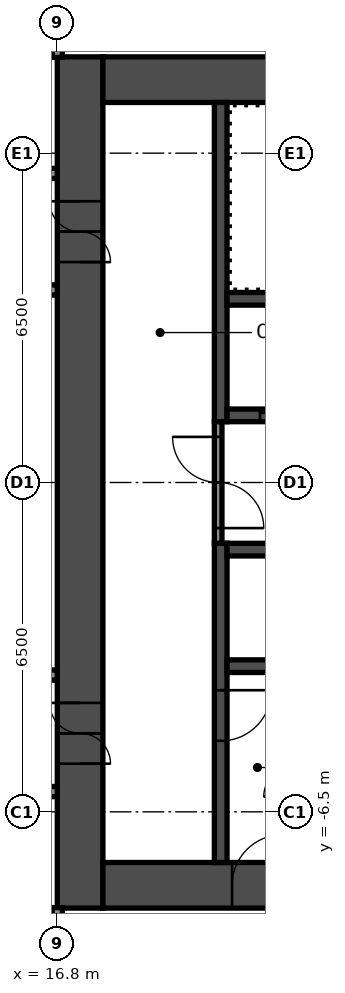
"""IFC4 building model, lengths in metres.
Left out: names, types, materials, properties, quantities, classifications, styles, units other than length and angle.
Written with IfcOpenShell. Run it as: python <this file> out.ifc"""

import sys

from ifc_helpers import new_model, si_unit, direction, frame, frame_2d, origin, place, context, subcontext, project, spatial, rectangle, extrude, element, fill, save


model = new_model("IFC4")
c1 = context("Model", 3, precision=1e-05, world=origin(), true_north=direction((0.0, 1.0)))
c2 = subcontext(c1, "Body", "Model", "MODEL_VIEW")
j1 = project(units=[si_unit("LENGTHUNIT", "METRE"), si_unit("PLANEANGLEUNIT", "RADIAN")], contexts=[c1])
p1 = place(None, origin())
s1 = spatial("IfcSite", under=j1, at=p1, CompositionType="ELEMENT")
p2 = place(p1, origin())
s2 = spatial("IfcBuilding", under=s1, at=p2, CompositionType="ELEMENT")
p3 = place(p2, frame((0.0, 0.0, 48.6)))
s3 = spatial("IfcBuildingStorey", under=s2, at=p3, CompositionType="ELEMENT", Elevation=48.6)
p4 = place(p3, frame((17.25, -8.4, 0.0), z_axis=(0.0, 0.0, 1.0), x_axis=(0.0, 1.0, 0.0)))
e1 = element("IfcWall", 1, at=p4, inside=s3, PredefinedType="SHEAR", context=c2, shape_type="SweptSolid", body=[
    extrude(rectangle(XDim=16.8, YDim=0.9, at=frame_2d((8.4, 0.0))), origin(), (0.0, 0.0, 1.0), 2.8),
])
p5 = place(p4, frame((12.75, 0.0, 0.0)))
e2 = element("IfcOpeningElement", 2, at=p5, cuts=e1, PredefinedType="OPENING", context=c2, shape_type="SweptSolid", body=[
    extrude(rectangle(XDim=1.2, YDim=2.1, at=frame_2d((0.6, 1.05))), frame((0.0, 0.46, 0.0), z_axis=(0.0, -1.0, 0.0), x_axis=(1.0, 0.0, 0.0)), (0.0, 0.0, 1.0), 0.92),
])
p6 = place(p4, frame((2.85, 0.0, 0.0)))
e3 = element("IfcOpeningElement", 3, at=p6, cuts=e1, PredefinedType="OPENING", context=c2, shape_type="SweptSolid", body=[
    extrude(rectangle(XDim=1.2, YDim=2.1, at=frame_2d((0.6, 1.05))), frame((0.0, 0.46, 0.0), z_axis=(0.0, -1.0, 0.0), x_axis=(1.0, 0.0, 0.0)), (0.0, 0.0, 1.0), 0.92),
])
p7 = place(p3, frame((17.7, 7.95, 0.0), z_axis=(0.0, 0.0, 1.0), x_axis=(1.0, 0.0, 0.0)))
e4 = element("IfcWall", 4, at=p7, inside=s3, PredefinedType="SHEAR", context=c2, shape_type="SweptSolid", body=[
    extrude(rectangle(XDim=15.0, YDim=0.9, at=frame_2d((7.5, 0.0))), origin(), (0.0, 0.0, 1.0), 2.8),
])
p8 = place(p7, frame((10.4, 0.0, 0.0)))
e5 = element("IfcOpeningElement", 5, at=p8, cuts=e4, PredefinedType="OPENING", context=c2, shape_type="SweptSolid", body=[
    extrude(rectangle(XDim=1.2, YDim=2.1, at=frame_2d((0.6, 1.05))), frame((0.0, 0.46, 0.0), z_axis=(0.0, -1.0, 0.0), x_axis=(1.0, 0.0, 0.0)), (0.0, 0.0, 1.0), 0.92),
])
p9 = place(p7, frame((13.35, 0.0, 0.0)))
e6 = element("IfcOpeningElement", 6, at=p9, cuts=e4, PredefinedType="OPENING", context=c2, shape_type="SweptSolid", body=[
    extrude(rectangle(XDim=0.9, YDim=2.1, at=frame_2d((0.45, 1.05))), frame((0.0, 0.46, 0.0), z_axis=(0.0, -1.0, 0.0), x_axis=(1.0, 0.0, 0.0)), (0.0, 0.0, 1.0), 0.92),
])
p10 = place(p3, frame((17.7, -7.95, 0.0), z_axis=(0.0, 0.0, 1.0), x_axis=(1.0, 0.0, 0.0)))
e7 = element("IfcWall", 7, at=p10, inside=s3, PredefinedType="SHEAR", context=c2, shape_type="SweptSolid", body=[
    extrude(rectangle(XDim=15.0, YDim=0.9, at=frame_2d((7.5, 0.0))), origin(), (0.0, 0.0, 1.0), 2.8),
])
p11 = place(p10, frame((2.55, 0.0, 0.0)))
e8 = element("IfcOpeningElement", 8, at=p11, cuts=e7, PredefinedType="OPENING", context=c2, shape_type="SweptSolid", body=[
    extrude(rectangle(XDim=1.0, YDim=2.1, at=frame_2d((0.5, 1.05))), frame((0.0, 0.46, 0.0), z_axis=(0.0, -1.0, 0.0), x_axis=(1.0, 0.0, 0.0)), (0.0, 0.0, 1.0), 0.92),
])
p12 = place(p3, frame((20.025, 1.2, 0.0), z_axis=(0.0, 0.0, 1.0), x_axis=(0.0, 1.0, 0.0)))
e9 = element("IfcWall", 9, at=p12, inside=s3, PredefinedType="SHEAR", context=c2, shape_type="SweptSolid", body=[
    extrude(rectangle(XDim=6.3, YDim=0.25, at=frame_2d((3.15, 0.0))), origin(), (0.0, 0.0, 1.0), 2.8),
])
p13 = place(p3, frame((20.025, -7.5, 0.0), z_axis=(0.0, 0.0, 1.0), x_axis=(0.0, 1.0, 0.0)))
e10 = element("IfcWall", 10, at=p13, inside=s3, PredefinedType="SHEAR", context=c2, shape_type="SweptSolid", body=[
    extrude(rectangle(XDim=6.3, YDim=0.25, at=frame_2d((3.15, 0.0))), origin(), (0.0, 0.0, 1.0), 2.8),
])
p14 = place(p13, frame((2.4, 0.0, 0.0)))
e11 = element("IfcOpeningElement", 11, at=p14, cuts=e10, PredefinedType="OPENING", context=c2, shape_type="SweptSolid", body=[
    extrude(rectangle(XDim=1.0, YDim=2.1, at=frame_2d((0.5, 1.05))), frame((0.0, 0.135, 0.0), z_axis=(0.0, -1.0, 0.0), x_axis=(1.0, 0.0, 0.0)), (0.0, 0.0, 1.0), 0.27),
])
p15 = place(p3, frame((20.15, 1.325, 0.0), z_axis=(0.0, 0.0, 1.0), x_axis=(1.0, 0.0, 0.0)))
e12 = element("IfcWall", 12, at=p15, inside=s3, PredefinedType="SHEAR", context=c2, shape_type="SweptSolid", body=[
    extrude(rectangle(XDim=7.5, YDim=0.25, at=frame_2d((3.75, 0.0))), origin(), (0.0, 0.0, 1.0), 2.8),
])
p16 = place(p15, frame((0.65, 0.0, 0.0)))
e13 = element("IfcOpeningElement", 13, at=p16, cuts=e12, PredefinedType="OPENING", context=c2, shape_type="SweptSolid", body=[
    extrude(rectangle(XDim=1.1, YDim=2.1, at=frame_2d((0.55, 1.05))), frame((0.0, 0.135, 0.0), z_axis=(0.0, -1.0, 0.0), x_axis=(1.0, 0.0, 0.0)), (0.0, 0.0, 1.0), 0.27),
])
p17 = place(p15, frame((3.05, 0.0, 0.0)))
e14 = element("IfcOpeningElement", 14, at=p17, cuts=e12, PredefinedType="OPENING", context=c2, shape_type="SweptSolid", body=[
    extrude(rectangle(XDim=1.1, YDim=2.1, at=frame_2d((0.55, 1.05))), frame((0.0, 0.135, 0.0), z_axis=(0.0, -1.0, 0.0), x_axis=(1.0, 0.0, 0.0)), (0.0, 0.0, 1.0), 0.27),
])
p18 = place(p15, frame((5.45, 0.0, 0.0)))
e15 = element("IfcOpeningElement", 15, at=p18, cuts=e12, PredefinedType="OPENING", context=c2, shape_type="SweptSolid", body=[
    extrude(rectangle(XDim=1.1, YDim=2.1, at=frame_2d((0.55, 1.05))), frame((0.0, 0.135, 0.0), z_axis=(0.0, -1.0, 0.0), x_axis=(1.0, 0.0, 0.0)), (0.0, 0.0, 1.0), 0.27),
])
for number, where, z_axis, x_axis in (
    (16, (20.15, 3.625, 0.0), (0.0, 0.0, 1.0), (1.0, 0.0, 0.0)),
    (17, (20.15, -1.325, 0.0), (0.0, 0.0, 1.0), (1.0, 0.0, 0.0)),
    (18, (20.15, -3.625, 0.0), (0.0, 0.0, 1.0), (1.0, 0.0, 0.0)),
):
    element("IfcWall", number, at=place(p3, frame(where, z_axis=z_axis, x_axis=x_axis)), inside=s3, PredefinedType="SHEAR", context=c2, shape_type="SweptSolid", body=[
        extrude(rectangle(XDim=7.5, YDim=0.25, at=frame_2d((3.75, 0.0))), origin(), (0.0, 0.0, 1.0), 2.8),
    ])
p19 = place(p3, frame((19.975, -1.2, 0.0), z_axis=(0.0, 0.0, 1.0), x_axis=(0.0, 1.0, 0.0)))
e19 = element("IfcWall", 19, at=p19, inside=s3, PredefinedType="PARTITIONING", context=c2, shape_type="SweptSolid", body=[
    extrude(rectangle(XDim=2.4, YDim=0.15, at=frame_2d((1.2, 0.0))), origin(), (0.0, 0.0, 1.0), 2.8),
])
p20 = place(p19, frame((0.3, 0.0, 0.0)))
e20 = element("IfcOpeningElement", 20, at=p20, cuts=e19, PredefinedType="OPENING", context=c2, shape_type="SweptSolid", body=[
    extrude(rectangle(XDim=1.8, YDim=2.1, at=frame_2d((0.9, 1.05))), frame((0.0, 0.085, 0.0), z_axis=(0.0, -1.0, 0.0), x_axis=(1.0, 0.0, 0.0)), (0.0, 0.0, 1.0), 0.17),
])
p21 = place(p3, frame((-16.8, -6.1, 0.0), z_axis=(0.0, 0.0, 1.0), x_axis=(1.0, 0.0, 0.0)))
e21 = element("IfcWall", 21, at=p21, inside=s3, PredefinedType="PARTITIONING", context=c2, shape_type="SweptSolid", body=[
    extrude(rectangle(XDim=33.6, YDim=0.2, at=frame_2d((16.8, 0.0))), origin(), (0.0, 0.0, 1.0), 2.8),
])
p22 = place(p21, frame((5.8, 0.0, 0.0)))
e22 = element("IfcOpeningElement", 22, at=p22, cuts=e21, PredefinedType="OPENING", context=c2, shape_type="SweptSolid", body=[
    extrude(rectangle(XDim=1.0, YDim=2.1, at=frame_2d((0.5, 1.05))), frame((0.0, 0.11, 0.0), z_axis=(0.0, -1.0, 0.0), x_axis=(1.0, 0.0, 0.0)), (0.0, 0.0, 1.0), 0.22),
])
p23 = place(p21, frame((10.0, 0.0, 0.0)))
e23 = element("IfcOpeningElement", 23, at=p23, cuts=e21, PredefinedType="OPENING", context=c2, shape_type="SweptSolid", body=[
    extrude(rectangle(XDim=1.0, YDim=2.1, at=frame_2d((0.5, 1.05))), frame((0.0, 0.11, 0.0), z_axis=(0.0, -1.0, 0.0), x_axis=(1.0, 0.0, 0.0)), (0.0, 0.0, 1.0), 0.22),
])
p24 = place(p21, frame((22.6, 0.0, 0.0)))
e24 = element("IfcOpeningElement", 24, at=p24, cuts=e21, PredefinedType="OPENING", context=c2, shape_type="SweptSolid", body=[
    extrude(rectangle(XDim=1.0, YDim=2.1, at=frame_2d((0.5, 1.05))), frame((0.0, 0.11, 0.0), z_axis=(0.0, -1.0, 0.0), x_axis=(1.0, 0.0, 0.0)), (0.0, 0.0, 1.0), 0.22),
])
p25 = place(p21, frame((31.0, 0.0, 0.0)))
e25 = element("IfcOpeningElement", 25, at=p25, cuts=e21, PredefinedType="OPENING", context=c2, shape_type="SweptSolid", body=[
    extrude(rectangle(XDim=1.0, YDim=2.1, at=frame_2d((0.5, 1.05))), frame((0.0, 0.11, 0.0), z_axis=(0.0, -1.0, 0.0), x_axis=(1.0, 0.0, 0.0)), (0.0, 0.0, 1.0), 0.22),
])
p26 = place(p3, frame((-16.8, -3.8, 0.0), z_axis=(0.0, 0.0, 1.0), x_axis=(1.0, 0.0, 0.0)))
e26 = element("IfcWall", 26, at=p26, inside=s3, PredefinedType="PARTITIONING", context=c2, shape_type="SweptSolid", body=[
    extrude(rectangle(XDim=33.6, YDim=0.2, at=frame_2d((16.8, 0.0))), origin(), (0.0, 0.0, 1.0), 2.8),
])
p27 = place(p26, frame((10.47, 0.0, 0.0)))
e27 = element("IfcOpeningElement", 27, at=p27, cuts=e26, PredefinedType="OPENING", context=c2, shape_type="SweptSolid", body=[
    extrude(rectangle(XDim=0.9, YDim=2.1, at=frame_2d((0.45, 1.05))), frame((0.0, 0.11, 0.0), z_axis=(0.0, -1.0, 0.0), x_axis=(1.0, 0.0, 0.0)), (0.0, 0.0, 1.0), 0.22),
])
p28 = place(p26, frame((14.67, 0.0, 0.0)))
e28 = element("IfcOpeningElement", 28, at=p28, cuts=e26, PredefinedType="OPENING", context=c2, shape_type="SweptSolid", body=[
    extrude(rectangle(XDim=0.9, YDim=2.1, at=frame_2d((0.45, 1.05))), frame((0.0, 0.11, 0.0), z_axis=(0.0, -1.0, 0.0), x_axis=(1.0, 0.0, 0.0)), (0.0, 0.0, 1.0), 0.22),
])
p29 = place(p26, frame((26.26, 0.0, 0.0)))
e29 = element("IfcOpeningElement", 29, at=p29, cuts=e26, PredefinedType="OPENING", context=c2, shape_type="SweptSolid", body=[
    extrude(rectangle(XDim=0.9, YDim=2.1, at=frame_2d((0.45, 1.05))), frame((0.0, 0.11, 0.0), z_axis=(0.0, -1.0, 0.0), x_axis=(1.0, 0.0, 0.0)), (0.0, 0.0, 1.0), 0.22),
])
p30 = place(p26, frame((30.46, 0.0, 0.0)))
e30 = element("IfcOpeningElement", 30, at=p30, cuts=e26, PredefinedType="OPENING", context=c2, shape_type="SweptSolid", body=[
    extrude(rectangle(XDim=0.9, YDim=2.1, at=frame_2d((0.45, 1.05))), frame((0.0, 0.11, 0.0), z_axis=(0.0, -1.0, 0.0), x_axis=(1.0, 0.0, 0.0)), (0.0, 0.0, 1.0), 0.22),
])
p31 = place(p3, frame((-16.8, 3.8, 0.0), z_axis=(0.0, 0.0, 1.0), x_axis=(1.0, 0.0, 0.0)))
e31 = element("IfcWall", 31, at=p31, inside=s3, PredefinedType="PARTITIONING", context=c2, shape_type="SweptSolid", body=[
    extrude(rectangle(XDim=33.6, YDim=0.2, at=frame_2d((16.8, 0.0))), origin(), (0.0, 0.0, 1.0), 2.8),
])
p32 = place(p31, frame((1.315, 0.0, 0.0)))
e32 = element("IfcOpeningElement", 32, at=p32, cuts=e31, PredefinedType="OPENING", context=c2, shape_type="SweptSolid", body=[
    extrude(rectangle(XDim=0.9, YDim=2.1, at=frame_2d((0.45, 1.05))), frame((0.0, 0.11, 0.0), z_axis=(0.0, -1.0, 0.0), x_axis=(1.0, 0.0, 0.0)), (0.0, 0.0, 1.0), 0.22),
])
p33 = place(p31, frame((5.515, 0.0, 0.0)))
e33 = element("IfcOpeningElement", 33, at=p33, cuts=e31, PredefinedType="OPENING", context=c2, shape_type="SweptSolid", body=[
    extrude(rectangle(XDim=0.9, YDim=2.1, at=frame_2d((0.45, 1.05))), frame((0.0, 0.11, 0.0), z_axis=(0.0, -1.0, 0.0), x_axis=(1.0, 0.0, 0.0)), (0.0, 0.0, 1.0), 0.22),
])
p34 = place(p31, frame((18.03, 0.0, 0.0)))
e34 = element("IfcOpeningElement", 34, at=p34, cuts=e31, PredefinedType="OPENING", context=c2, shape_type="SweptSolid", body=[
    extrude(rectangle(XDim=0.9, YDim=2.1, at=frame_2d((0.45, 1.05))), frame((0.0, 0.11, 0.0), z_axis=(0.0, -1.0, 0.0), x_axis=(1.0, 0.0, 0.0)), (0.0, 0.0, 1.0), 0.22),
])
p35 = place(p31, frame((22.23, 0.0, 0.0)))
e35 = element("IfcOpeningElement", 35, at=p35, cuts=e31, PredefinedType="OPENING", context=c2, shape_type="SweptSolid", body=[
    extrude(rectangle(XDim=0.9, YDim=2.1, at=frame_2d((0.45, 1.05))), frame((0.0, 0.11, 0.0), z_axis=(0.0, -1.0, 0.0), x_axis=(1.0, 0.0, 0.0)), (0.0, 0.0, 1.0), 0.22),
])
p36 = place(p3, frame((-16.8, 6.1, 0.0), z_axis=(0.0, 0.0, 1.0), x_axis=(1.0, 0.0, 0.0)))
e36 = element("IfcWall", 36, at=p36, inside=s3, PredefinedType="PARTITIONING", context=c2, shape_type="SweptSolid", body=[
    extrude(rectangle(XDim=33.6, YDim=0.2, at=frame_2d((16.8, 0.0))), origin(), (0.0, 0.0, 1.0), 2.8),
])
p37 = place(p36, frame((1.6, 0.0, 0.0)))
e37 = element("IfcOpeningElement", 37, at=p37, cuts=e36, PredefinedType="OPENING", context=c2, shape_type="SweptSolid", body=[
    extrude(rectangle(XDim=1.0, YDim=2.1, at=frame_2d((0.5, 1.05))), frame((0.0, 0.11, 0.0), z_axis=(0.0, -1.0, 0.0), x_axis=(1.0, 0.0, 0.0)), (0.0, 0.0, 1.0), 0.22),
])
p38 = place(p36, frame((10.0, 0.0, 0.0)))
e38 = element("IfcOpeningElement", 38, at=p38, cuts=e36, PredefinedType="OPENING", context=c2, shape_type="SweptSolid", body=[
    extrude(rectangle(XDim=1.0, YDim=2.1, at=frame_2d((0.5, 1.05))), frame((0.0, 0.11, 0.0), z_axis=(0.0, -1.0, 0.0), x_axis=(1.0, 0.0, 0.0)), (0.0, 0.0, 1.0), 0.22),
])
p39 = place(p36, frame((18.4, 0.0, 0.0)))
e39 = element("IfcOpeningElement", 39, at=p39, cuts=e36, PredefinedType="OPENING", context=c2, shape_type="SweptSolid", body=[
    extrude(rectangle(XDim=1.0, YDim=2.1, at=frame_2d((0.5, 1.05))), frame((0.0, 0.11, 0.0), z_axis=(0.0, -1.0, 0.0), x_axis=(1.0, 0.0, 0.0)), (0.0, 0.0, 1.0), 0.22),
])
p40 = place(p36, frame((26.8, 0.0, 0.0)))
e40 = element("IfcOpeningElement", 40, at=p40, cuts=e36, PredefinedType="OPENING", context=c2, shape_type="SweptSolid", body=[
    extrude(rectangle(XDim=1.0, YDim=2.1, at=frame_2d((0.5, 1.05))), frame((0.0, 0.11, 0.0), z_axis=(0.0, -1.0, 0.0), x_axis=(1.0, 0.0, 0.0)), (0.0, 0.0, 1.0), 0.22),
])
for number, where, z_axis, x_axis in (
    (41, (16.8, -20.3, 0.0), (0.0, 0.0, 1.0), (0.0, 1.0, 0.0)),
    (42, (16.8, 8.39, 0.0), (0.0, 0.0, 1.0), (0.0, 1.0, 0.0)),
):
    element("IfcWall", number, at=place(p3, frame(where, z_axis=z_axis, x_axis=x_axis)), inside=s3, PredefinedType="PARTITIONING", context=c2, shape_type="SweptSolid", body=[
        extrude(rectangle(XDim=11.91, YDim=0.2, at=frame_2d((5.955, 0.0))), origin(), (0.0, 0.0, 1.0), 2.8),
    ])
p41 = place(p5, origin())
e43 = element("IfcDoor", 43, at=p41, inside=s3, OperationType="DOUBLE_DOOR_SINGLE_SWING", PredefinedType="DOOR", context=c2, shape_type="SweptSolid", body=[
    extrude(rectangle(XDim=1.2, YDim=2.1, at=frame_2d((0.6, 1.05))), frame((0.0, 0.025, 0.0), z_axis=(0.0, -1.0, 0.0), x_axis=(1.0, 0.0, 0.0)), (0.0, 0.0, 1.0), 0.05),
])
fill(e2, e43)
p42 = place(p6, origin())
e44 = element("IfcDoor", 44, at=p42, inside=s3, OperationType="DOUBLE_DOOR_SINGLE_SWING", PredefinedType="DOOR", context=c2, shape_type="SweptSolid", body=[
    extrude(rectangle(XDim=1.2, YDim=2.1, at=frame_2d((0.6, 1.05))), frame((0.0, 0.025, 0.0), z_axis=(0.0, -1.0, 0.0), x_axis=(1.0, 0.0, 0.0)), (0.0, 0.0, 1.0), 0.05),
])
fill(e3, e44)
p43 = place(p11, origin())
e45 = element("IfcDoor", 45, at=p43, inside=s3, OperationType="SINGLE_SWING_LEFT", PredefinedType="DOOR", context=c2, shape_type="SweptSolid", body=[
    extrude(rectangle(XDim=1.0, YDim=2.1, at=frame_2d((0.5, 1.05))), frame((0.0, 0.025, 0.0), z_axis=(0.0, -1.0, 0.0), x_axis=(1.0, 0.0, 0.0)), (0.0, 0.0, 1.0), 0.05),
])
fill(e8, e45)
p44 = place(p14, origin())
e46 = element("IfcDoor", 46, at=p44, inside=s3, OperationType="SINGLE_SWING_RIGHT", PredefinedType="DOOR", context=c2, shape_type="SweptSolid", body=[
    extrude(rectangle(XDim=1.0, YDim=2.1, at=frame_2d((0.5, 1.05))), frame((0.0, 0.025, 0.0), z_axis=(0.0, -1.0, 0.0), x_axis=(1.0, 0.0, 0.0)), (0.0, 0.0, 1.0), 0.05),
])
fill(e11, e46)
p45 = place(p20, origin())
e47 = element("IfcDoor", 47, at=p45, inside=s3, OperationType="DOUBLE_DOOR_SINGLE_SWING", PredefinedType="DOOR", context=c2, shape_type="SweptSolid", body=[
    extrude(rectangle(XDim=1.8, YDim=2.1, at=frame_2d((0.9, 1.05))), frame((0.0, 0.025, 0.0), z_axis=(0.0, -1.0, 0.0), x_axis=(1.0, 0.0, 0.0)), (0.0, 0.0, 1.0), 0.05),
])
fill(e20, e47)
p46 = place(p16, origin())
e48 = element("IfcDoor", 48, at=p46, inside=s3, OperationType="DOUBLE_DOOR_SLIDING", PredefinedType="DOOR", context=c2, shape_type="SweptSolid", body=[
    extrude(rectangle(XDim=1.1, YDim=2.1, at=frame_2d((0.55, 1.05))), frame((0.0, 0.025, 0.0), z_axis=(0.0, -1.0, 0.0), x_axis=(1.0, 0.0, 0.0)), (0.0, 0.0, 1.0), 0.05),
])
fill(e13, e48)
save(model, sys.argv[1])
